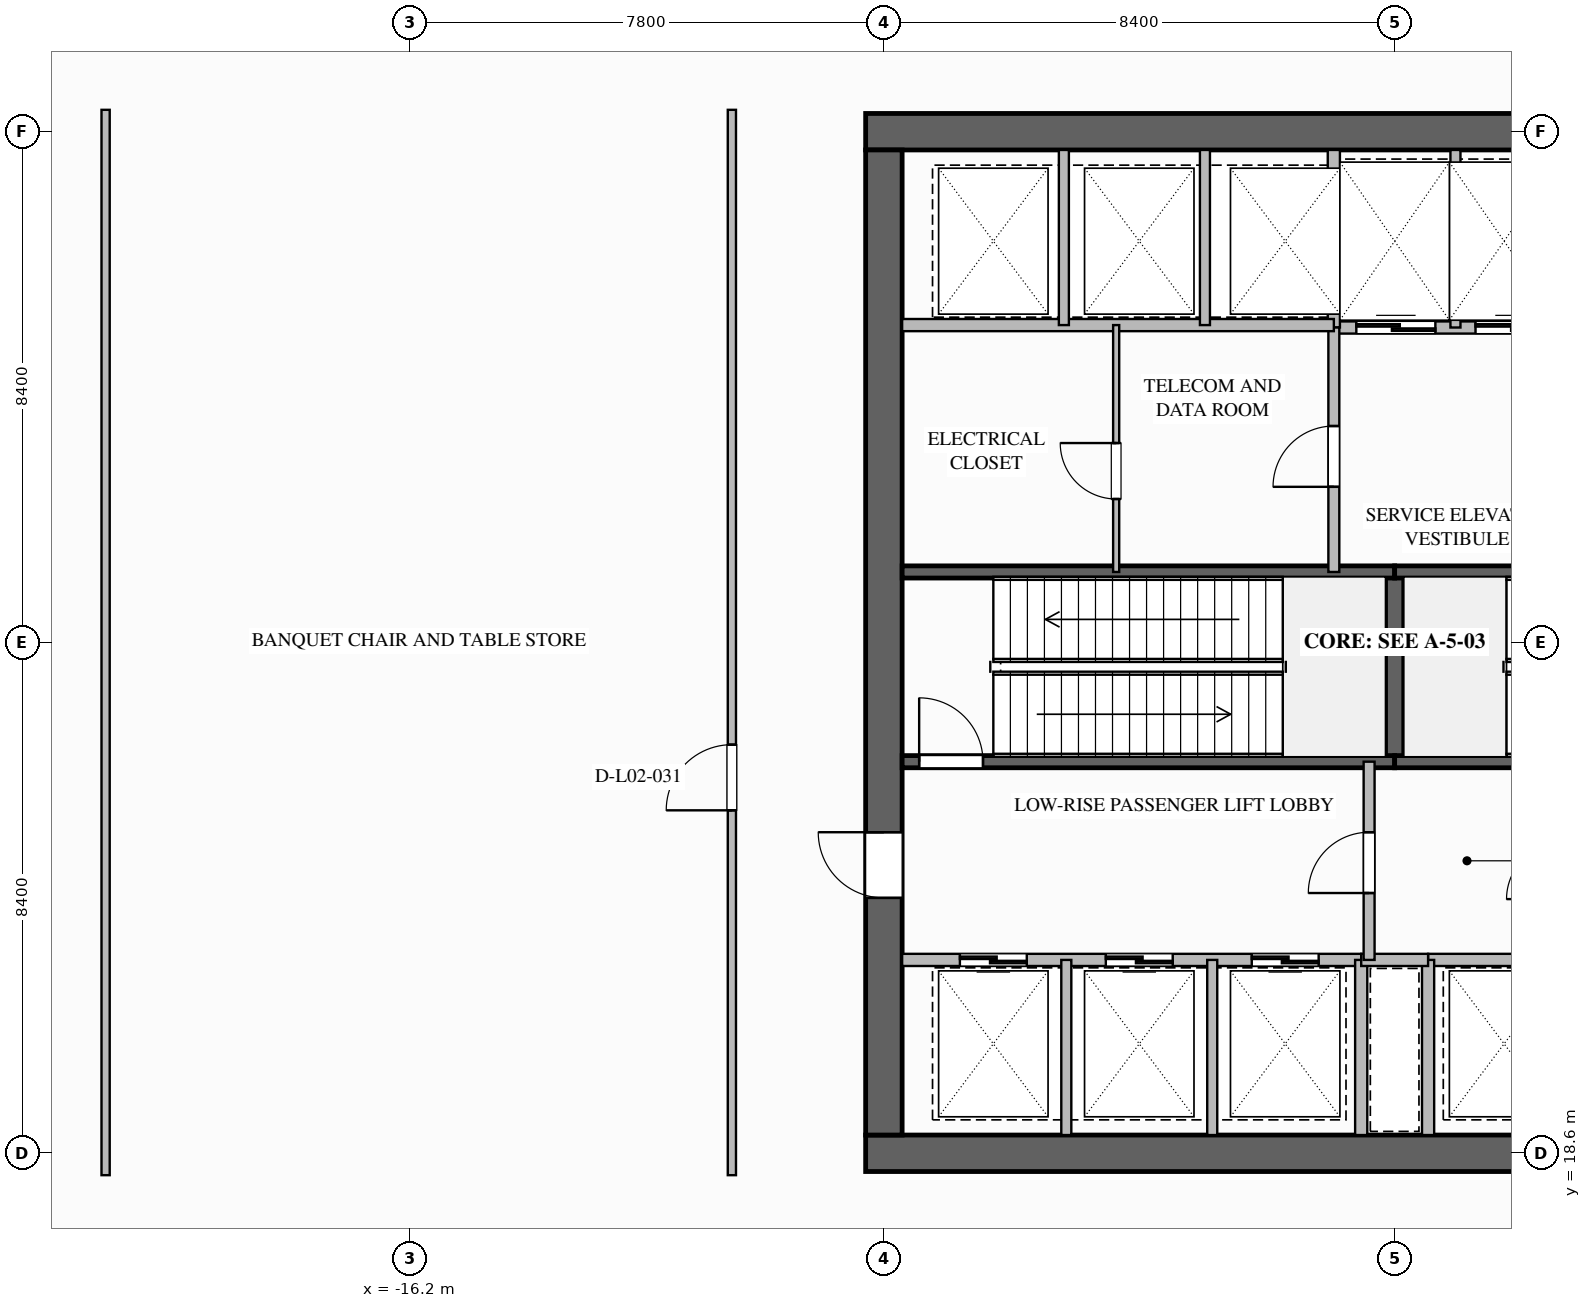
"""IFC4 building model, lengths in metres.
Left out: names, types, materials, properties, quantities, classifications, styles, units other than length and angle.
Written with IfcOpenShell. Run it as: python <this file> out.ifc"""

import sys

from ifc_helpers import new_model, si_unit, direction, frame, frame_2d, origin, place, context, subcontext, project, spatial, rectangle, extrude, element, fill, save


model = new_model("IFC4")
c1 = context("Model", 3, precision=1e-05, world=origin(), true_north=direction((0.0, 1.0)))
c2 = subcontext(c1, "Body", "Model", "MODEL_VIEW")
j1 = project(units=[si_unit("LENGTHUNIT", "METRE"), si_unit("PLANEANGLEUNIT", "RADIAN")], contexts=[c1])
p1 = place(None, origin())
s1 = spatial("IfcSite", under=j1, at=p1, CompositionType="ELEMENT")
p2 = place(p1, origin())
s2 = spatial("IfcBuilding", under=s1, at=p2, CompositionType="ELEMENT")
p3 = place(p2, frame((0.0, 0.0, 10.8)))
s3 = spatial("IfcBuildingStorey", under=s2, at=p3, CompositionType="ELEMENT", Elevation=10.8)
for number, where, z_axis, x_axis in (
    (1, (-8.7, 35.4, 0.0), (0.0, 0.0, 1.0), (1.0, 0.0, 0.0)),
    (2, (8.7, 18.6, 0.0), (0.0, 0.0, 1.0), (-1.0, 0.0, 0.0)),
):
    element("IfcWall", number, at=place(p3, frame(where, z_axis=z_axis, x_axis=x_axis)), inside=s3, PredefinedType="SHEAR", context=c2, shape_type="SweptSolid", body=[
        extrude(rectangle(XDim=17.4, YDim=0.6, at=frame_2d((8.7, 0.0))), origin(), (0.0, 0.0, 1.0), 6.4),
    ])
p4 = place(p3, frame((-8.4, 18.9, 0.0), z_axis=(0.0, 0.0, 1.0), x_axis=(0.0, 1.0, 0.0)))
e3 = element("IfcWall", 3, at=p4, inside=s3, PredefinedType="SHEAR", context=c2, shape_type="SweptSolid", body=[
    extrude(rectangle(XDim=16.2, YDim=0.6, at=frame_2d((8.1, 0.0))), origin(), (0.0, 0.0, 1.0), 6.4),
])
p5 = place(p4, frame((3.9, 0.0, 0.0)))
e4 = element("IfcOpeningElement", 4, at=p5, cuts=e3, PredefinedType="OPENING", context=c2, shape_type="SweptSolid", body=[
    extrude(rectangle(XDim=1.08, YDim=2.04, at=frame_2d((0.54, 1.02))), frame((0.0, 0.31, 0.0), z_axis=(0.0, -1.0, 0.0), x_axis=(1.0, 0.0, 0.0)), (0.0, 0.0, 1.0), 0.62),
])
p6 = place(p3, frame((0.0, 25.04, 0.0), z_axis=(0.0, 0.0, 1.0), x_axis=(0.0, 1.0, 0.0)))
e5 = element("IfcWall", 5, at=p6, inside=s3, PredefinedType="SOLIDWALL", context=c2, shape_type="SweptSolid", body=[
    extrude(rectangle(XDim=3.12, YDim=0.3, at=frame_2d((1.56, 0.0))), origin(), (0.0, 0.0, 1.0), 6.1),
])
p7 = place(p3, frame((-8.1, 25.04, 0.0), z_axis=(0.0, 0.0, 1.0), x_axis=(1.0, 0.0, 0.0)))
e6 = element("IfcWall", 6, at=p7, inside=s3, PredefinedType="SOLIDWALL", context=c2, shape_type="SweptSolid", body=[
    extrude(rectangle(XDim=8.1, YDim=0.2, at=frame_2d((4.05, 0.0))), origin(), (0.0, 0.0, 1.0), 6.1),
])
p8 = place(p7, frame((0.28, 0.0, 0.0)))
e7 = element("IfcOpeningElement", 7, at=p8, cuts=e6, PredefinedType="OPENING", context=c2, shape_type="SweptSolid", body=[
    extrude(rectangle(XDim=1.05, YDim=2.1, at=frame_2d((0.525, 1.05))), frame((0.0, 0.11, 0.0), z_axis=(0.0, -1.0, 0.0), x_axis=(1.0, 0.0, 0.0)), (0.0, 0.0, 1.0), 0.22),
])
for number, where, z_axis, x_axis in (
    (8, (-8.1, 28.16, 0.0), (0.0, 0.0, 1.0), (1.0, 0.0, 0.0)),
    (9, (0.0, 25.04, 0.0), (0.0, 0.0, 1.0), (1.0, 0.0, 0.0)),
):
    element("IfcWall", number, at=place(p3, frame(where, z_axis=z_axis, x_axis=x_axis)), inside=s3, PredefinedType="SOLIDWALL", context=c2, shape_type="SweptSolid", body=[
        extrude(rectangle(XDim=8.1, YDim=0.2, at=frame_2d((4.05, 0.0))), origin(), (0.0, 0.0, 1.0), 6.1),
    ])
p9 = place(p3, frame((8.1, 28.16, 0.0), z_axis=(0.0, 0.0, 1.0), x_axis=(-1.0, 0.0, 0.0)))
e10 = element("IfcWall", 10, at=p9, inside=s3, PredefinedType="SOLIDWALL", context=c2, shape_type="SweptSolid", body=[
    extrude(rectangle(XDim=8.1, YDim=0.2, at=frame_2d((4.05, 0.0))), origin(), (0.0, 0.0, 1.0), 6.1),
])
p10 = place(p9, frame((0.28, 0.0, 0.0)))
e11 = element("IfcOpeningElement", 11, at=p10, cuts=e10, PredefinedType="OPENING", context=c2, shape_type="SweptSolid", body=[
    extrude(rectangle(XDim=1.05, YDim=2.1, at=frame_2d((0.525, 1.05))), frame((0.0, 0.11, 0.0), z_axis=(0.0, -1.0, 0.0), x_axis=(1.0, 0.0, 0.0)), (0.0, 0.0, 1.0), 0.22),
])
p11 = place(p3, frame((-1.0, 32.18, 0.0), z_axis=(0.0, 0.0, 1.0), x_axis=(1.0, 0.0, 0.0)))
e12 = element("IfcWall", 12, at=p11, inside=s3, PredefinedType="SOLIDWALL", context=c2, shape_type="SweptSolid", body=[
    extrude(rectangle(XDim=4.1, YDim=0.2, at=frame_2d((2.05, 0.0))), origin(), (0.0, 0.0, 1.0), 6.1),
])
p12 = place(p11, frame((0.37, 0.0, 0.0)))
e13 = element("IfcOpeningElement", 13, at=p12, cuts=e12, PredefinedType="OPENING", context=c2, shape_type="SweptSolid", body=[
    extrude(rectangle(XDim=1.3, YDim=2.2, at=frame_2d((0.65, 1.1))), frame((0.0, 0.11, 0.0), z_axis=(0.0, -1.0, 0.0), x_axis=(1.0, 0.0, 0.0)), (0.0, 0.0, 1.0), 0.22),
])
p13 = place(p11, frame((2.33, 0.0, 0.0)))
e14 = element("IfcOpeningElement", 14, at=p13, cuts=e12, PredefinedType="OPENING", context=c2, shape_type="SweptSolid", body=[
    extrude(rectangle(XDim=1.3, YDim=2.2, at=frame_2d((0.65, 1.1))), frame((0.0, 0.11, 0.0), z_axis=(0.0, -1.0, 0.0), x_axis=(1.0, 0.0, 0.0)), (0.0, 0.0, 1.0), 0.22),
])
p14 = place(p3, frame((-1.0, 32.18, 0.0), z_axis=(0.0, 0.0, 1.0), x_axis=(0.0, 1.0, 0.0)))
e15 = element("IfcWall", 15, at=p14, inside=s3, PredefinedType="SOLIDWALL", context=c2, shape_type="SweptSolid", body=[
    extrude(rectangle(XDim=2.92, YDim=0.2, at=frame_2d((1.46, 0.0))), origin(), (0.0, 0.0, 1.0), 6.1),
])
p15 = place(p3, frame((1.0, 32.18, 0.0), z_axis=(0.0, 0.0, 1.0), x_axis=(0.0, 1.0, 0.0)))
e16 = element("IfcWall", 16, at=p15, inside=s3, PredefinedType="PARTITIONING", context=c2, shape_type="SweptSolid", body=[
    extrude(rectangle(XDim=2.92, YDim=0.165, at=frame_2d((1.46, 0.0))), origin(), (0.0, 0.0, 1.0), 6.1),
])
p16 = place(p3, frame((-1.0, 28.16, 0.0), z_axis=(0.0, 0.0, 1.0), x_axis=(0.0, 1.0, 0.0)))
e17 = element("IfcWall", 17, at=p16, inside=s3, PredefinedType="SOLIDWALL", context=c2, shape_type="SweptSolid", body=[
    extrude(rectangle(XDim=4.02, YDim=0.18, at=frame_2d((2.01, 0.0))), origin(), (0.0, 0.0, 1.0), 6.1),
])
p17 = place(p16, frame((1.4, 0.0, 0.0)))
e18 = element("IfcOpeningElement", 18, at=p17, cuts=e17, PredefinedType="OPENING", context=c2, shape_type="SweptSolid", body=[
    extrude(rectangle(XDim=1.0, YDim=2.1, at=frame_2d((0.5, 1.05))), frame((0.0, 0.1, 0.0), z_axis=(0.0, -1.0, 0.0), x_axis=(1.0, 0.0, 0.0)), (0.0, 0.0, 1.0), 0.2),
])
p18 = place(p3, frame((-8.1, 32.22, 0.0), z_axis=(0.0, 0.0, 1.0), x_axis=(1.0, 0.0, 0.0)))
e19 = element("IfcWall", 19, at=p18, inside=s3, PredefinedType="SOLIDWALL", context=c2, shape_type="SweptSolid", body=[
    extrude(rectangle(XDim=7.1, YDim=0.2, at=frame_2d((3.55, 0.0))), origin(), (0.0, 0.0, 1.0), 6.1),
])
for number, where, z_axis, x_axis in (
    (20, (-5.44, 32.22, 0.0), (0.0, 0.0, 1.0), (0.0, 1.0, 0.0)),
    (21, (-3.12, 32.22, 0.0), (0.0, 0.0, 1.0), (0.0, 1.0, 0.0)),
):
    element("IfcWall", number, at=place(p3, frame(where, z_axis=z_axis, x_axis=x_axis)), inside=s3, PredefinedType="PARTITIONING", context=c2, shape_type="SweptSolid", body=[
        extrude(rectangle(XDim=2.88, YDim=0.165, at=frame_2d((1.44, 0.0))), origin(), (0.0, 0.0, 1.0), 6.1),
    ])
p19 = place(p3, frame((-4.58, 28.16, 0.0), z_axis=(0.0, 0.0, 1.0), x_axis=(0.0, 1.0, 0.0)))
e22 = element("IfcWall", 22, at=p19, inside=s3, PredefinedType="PARTITIONING", context=c2, shape_type="SweptSolid", body=[
    extrude(rectangle(XDim=4.06, YDim=0.1, at=frame_2d((2.03, 0.0))), origin(), (0.0, 0.0, 1.0), 6.1),
])
p20 = place(p19, frame((1.2, 0.0, 0.0)))
e23 = element("IfcOpeningElement", 23, at=p20, cuts=e22, PredefinedType="OPENING", context=c2, shape_type="SweptSolid", body=[
    extrude(rectangle(XDim=0.92, YDim=2.1, at=frame_2d((0.46, 1.05))), frame((0.0, 0.06, 0.0), z_axis=(0.0, -1.0, 0.0), x_axis=(1.0, 0.0, 0.0)), (0.0, 0.0, 1.0), 0.12),
])
p21 = place(p3, frame((-0.55, 21.78, 0.0), z_axis=(0.0, 0.0, 1.0), x_axis=(-1.0, 0.0, 0.0)))
e24 = element("IfcWall", 24, at=p21, inside=s3, PredefinedType="SOLIDWALL", context=c2, shape_type="SweptSolid", body=[
    extrude(rectangle(XDim=7.55, YDim=0.2, at=frame_2d((3.775, 0.0))), origin(), (0.0, 0.0, 1.0), 6.1),
])
p22 = place(p21, frame((5.5, 0.0, 0.0)))
e25 = element("IfcOpeningElement", 25, at=p22, cuts=e24, PredefinedType="OPENING", context=c2, shape_type="SweptSolid", body=[
    extrude(rectangle(XDim=1.1, YDim=2.2, at=frame_2d((0.55, 1.1))), frame((0.0, 0.11, 0.0), z_axis=(0.0, -1.0, 0.0), x_axis=(1.0, 0.0, 0.0)), (0.0, 0.0, 1.0), 0.22),
])
p23 = place(p21, frame((3.1, 0.0, 0.0)))
e26 = element("IfcOpeningElement", 26, at=p23, cuts=e24, PredefinedType="OPENING", context=c2, shape_type="SweptSolid", body=[
    extrude(rectangle(XDim=1.1, YDim=2.2, at=frame_2d((0.55, 1.1))), frame((0.0, 0.11, 0.0), z_axis=(0.0, -1.0, 0.0), x_axis=(1.0, 0.0, 0.0)), (0.0, 0.0, 1.0), 0.22),
])
p24 = place(p21, frame((0.7, 0.0, 0.0)))
e27 = element("IfcOpeningElement", 27, at=p24, cuts=e24, PredefinedType="OPENING", context=c2, shape_type="SweptSolid", body=[
    extrude(rectangle(XDim=1.1, YDim=2.2, at=frame_2d((0.55, 1.1))), frame((0.0, 0.11, 0.0), z_axis=(0.0, -1.0, 0.0), x_axis=(1.0, 0.0, 0.0)), (0.0, 0.0, 1.0), 0.22),
])
for number, where, z_axis, x_axis in (
    (28, (-5.4, 18.9, 0.0), (0.0, 0.0, 1.0), (0.0, 1.0, 0.0)),
    (29, (-3.0, 18.9, 0.0), (0.0, 0.0, 1.0), (0.0, 1.0, 0.0)),
):
    element("IfcWall", number, at=place(p3, frame(where, z_axis=z_axis, x_axis=x_axis)), inside=s3, PredefinedType="PARTITIONING", context=c2, shape_type="SweptSolid", body=[
        extrude(rectangle(XDim=2.88, YDim=0.165, at=frame_2d((1.44, 0.0))), origin(), (0.0, 0.0, 1.0), 6.1),
    ])
p25 = place(p3, frame((-0.55, 18.9, 0.0), z_axis=(0.0, 0.0, 1.0), x_axis=(0.0, 1.0, 0.0)))
e30 = element("IfcWall", 30, at=p25, inside=s3, PredefinedType="SOLIDWALL", context=c2, shape_type="SweptSolid", body=[
    extrude(rectangle(XDim=2.88, YDim=0.2, at=frame_2d((1.44, 0.0))), origin(), (0.0, 0.0, 1.0), 6.1),
])
p26 = place(p3, frame((8.1, 21.78, 0.0), z_axis=(0.0, 0.0, 1.0), x_axis=(-1.0, 0.0, 0.0)))
e31 = element("IfcWall", 31, at=p26, inside=s3, PredefinedType="SOLIDWALL", context=c2, shape_type="SweptSolid", body=[
    extrude(rectangle(XDim=7.55, YDim=0.2, at=frame_2d((3.775, 0.0))), origin(), (0.0, 0.0, 1.0), 6.1),
])
p27 = place(p3, frame((0.55, 18.9, 0.0), z_axis=(0.0, 0.0, 1.0), x_axis=(0.0, 1.0, 0.0)))
e32 = element("IfcWall", 32, at=p27, inside=s3, PredefinedType="SOLIDWALL", context=c2, shape_type="SweptSolid", body=[
    extrude(rectangle(XDim=2.88, YDim=0.2, at=frame_2d((1.44, 0.0))), origin(), (0.0, 0.0, 1.0), 6.1),
])
p28 = place(p3, frame((-0.55, 21.78, 0.0), z_axis=(0.0, 0.0, 1.0), x_axis=(1.0, 0.0, 0.0)))
e33 = element("IfcWall", 33, at=p28, inside=s3, PredefinedType="SOLIDWALL", context=c2, shape_type="SweptSolid", body=[
    extrude(rectangle(XDim=1.1, YDim=0.2, at=frame_2d((0.55, 0.0))), origin(), (0.0, 0.0, 1.0), 6.1),
])
p29 = place(p3, frame((-0.42, 21.78, 0.0), z_axis=(0.0, 0.0, 1.0), x_axis=(0.0, 1.0, 0.0)))
e34 = element("IfcWall", 34, at=p29, inside=s3, PredefinedType="SOLIDWALL", context=c2, shape_type="SweptSolid", body=[
    extrude(rectangle(XDim=3.26, YDim=0.18, at=frame_2d((1.63, 0.0))), origin(), (0.0, 0.0, 1.0), 6.1),
])
p30 = place(p29, frame((1.1, 0.0, 0.0)))
e35 = element("IfcOpeningElement", 35, at=p30, cuts=e34, PredefinedType="OPENING", context=c2, shape_type="SweptSolid", body=[
    extrude(rectangle(XDim=1.0, YDim=2.1, at=frame_2d((0.5, 1.05))), frame((0.0, 0.1, 0.0), z_axis=(0.0, -1.0, 0.0), x_axis=(1.0, 0.0, 0.0)), (0.0, 0.0, 1.0), 0.2),
])
p31 = place(p3, frame((-10.9, 18.24, 0.0), z_axis=(0.0, 0.0, 1.0), x_axis=(0.0, 1.0, 0.0)))
e36 = element("IfcWall", 36, at=p31, inside=s3, PredefinedType="PARTITIONING", context=c2, shape_type="SweptSolid", body=[
    extrude(rectangle(XDim=17.52, YDim=0.135, at=frame_2d((8.76, 0.0))), origin(), (0.0, 0.0, 1.0), 6.1),
])
p32 = place(p31, frame((6.0, 0.0, 0.0)))
e37 = element("IfcOpeningElement", 37, at=p32, cuts=e36, PredefinedType="OPENING", context=c2, shape_type="SweptSolid", body=[
    extrude(rectangle(XDim=1.08, YDim=2.04, at=frame_2d((0.54, 1.02))), frame((0.0, 0.077, 0.0), z_axis=(0.0, -1.0, 0.0), x_axis=(1.0, 0.0, 0.0)), (0.0, 0.0, 1.0), 0.155),
])
p33 = place(p3, frame((-21.2, 18.24, 0.0), z_axis=(0.0, 0.0, 1.0), x_axis=(0.0, 1.0, 0.0)))
e38 = element("IfcWall", 38, at=p33, inside=s3, PredefinedType="PARTITIONING", context=c2, shape_type="SweptSolid", body=[
    extrude(rectangle(XDim=17.52, YDim=0.135, at=frame_2d((8.76, 0.0))), origin(), (0.0, 0.0, 1.0), 6.1),
])
p34 = place(p8, origin())
e39 = element("IfcDoor", 39, at=p34, inside=s3, OperationType="SINGLE_SWING_LEFT", PredefinedType="DOOR", context=c2, shape_type="SweptSolid", body=[
    extrude(rectangle(XDim=1.05, YDim=2.1, at=frame_2d((0.525, 1.05))), frame((0.0, 0.025, 0.0), z_axis=(0.0, -1.0, 0.0), x_axis=(1.0, 0.0, 0.0)), (0.0, 0.0, 1.0), 0.05),
])
fill(e7, e39)
p35 = place(p12, origin())
e40 = element("IfcDoor", 40, at=p35, inside=s3, OperationType="SLIDING_TO_LEFT", PredefinedType="DOOR", context=c2, shape_type="SweptSolid", body=[
    extrude(rectangle(XDim=1.3, YDim=2.2, at=frame_2d((0.65, 1.1))), frame((0.0, 0.025, 0.0), z_axis=(0.0, -1.0, 0.0), x_axis=(1.0, 0.0, 0.0)), (0.0, 0.0, 1.0), 0.05),
])
fill(e13, e40)
p36 = place(p13, origin())
e41 = element("IfcDoor", 41, at=p36, inside=s3, OperationType="SLIDING_TO_LEFT", PredefinedType="DOOR", context=c2, shape_type="SweptSolid", body=[
    extrude(rectangle(XDim=1.3, YDim=2.2, at=frame_2d((0.65, 1.1))), frame((0.0, 0.025, 0.0), z_axis=(0.0, -1.0, 0.0), x_axis=(1.0, 0.0, 0.0)), (0.0, 0.0, 1.0), 0.05),
])
fill(e14, e41)
p37 = place(p17, origin())
e42 = element("IfcDoor", 42, at=p37, inside=s3, OperationType="SINGLE_SWING_LEFT", PredefinedType="DOOR", context=c2, shape_type="SweptSolid", body=[
    extrude(rectangle(XDim=1.0, YDim=2.1, at=frame_2d((0.5, 1.05))), frame((0.0, 0.025, 0.0), z_axis=(0.0, -1.0, 0.0), x_axis=(1.0, 0.0, 0.0)), (0.0, 0.0, 1.0), 0.05),
])
fill(e18, e42)
p38 = place(p20, origin())
e43 = element("IfcDoor", 43, at=p38, inside=s3, OperationType="SINGLE_SWING_RIGHT", PredefinedType="DOOR", context=c2, shape_type="SweptSolid", body=[
    extrude(rectangle(XDim=0.92, YDim=2.1, at=frame_2d((0.46, 1.05))), frame((0.0, 0.025, 0.0), z_axis=(0.0, -1.0, 0.0), x_axis=(1.0, 0.0, 0.0)), (0.0, 0.0, 1.0), 0.05),
])
fill(e23, e43)
p39 = place(p22, origin())
e44 = element("IfcDoor", 44, at=p39, inside=s3, OperationType="SLIDING_TO_LEFT", PredefinedType="DOOR", context=c2, shape_type="SweptSolid", body=[
    extrude(rectangle(XDim=1.1, YDim=2.2, at=frame_2d((0.55, 1.1))), frame((0.0, 0.025, 0.0), z_axis=(0.0, -1.0, 0.0), x_axis=(1.0, 0.0, 0.0)), (0.0, 0.0, 1.0), 0.05),
])
fill(e25, e44)
p40 = place(p23, origin())
e45 = element("IfcDoor", 45, at=p40, inside=s3, OperationType="SLIDING_TO_LEFT", PredefinedType="DOOR", context=c2, shape_type="SweptSolid", body=[
    extrude(rectangle(XDim=1.1, YDim=2.2, at=frame_2d((0.55, 1.1))), frame((0.0, 0.025, 0.0), z_axis=(0.0, -1.0, 0.0), x_axis=(1.0, 0.0, 0.0)), (0.0, 0.0, 1.0), 0.05),
])
fill(e26, e45)
p41 = place(p24, origin())
e46 = element("IfcDoor", 46, at=p41, inside=s3, OperationType="SLIDING_TO_LEFT", PredefinedType="DOOR", context=c2, shape_type="SweptSolid", body=[
    extrude(rectangle(XDim=1.1, YDim=2.2, at=frame_2d((0.55, 1.1))), frame((0.0, 0.025, 0.0), z_axis=(0.0, -1.0, 0.0), x_axis=(1.0, 0.0, 0.0)), (0.0, 0.0, 1.0), 0.05),
])
fill(e27, e46)
p42 = place(p30, origin())
e47 = element("IfcDoor", 47, at=p42, inside=s3, OperationType="SINGLE_SWING_LEFT", PredefinedType="DOOR", context=c2, shape_type="SweptSolid", body=[
    extrude(rectangle(XDim=1.0, YDim=2.1, at=frame_2d((0.5, 1.05))), frame((0.0, 0.025, 0.0), z_axis=(0.0, -1.0, 0.0), x_axis=(1.0, 0.0, 0.0)), (0.0, 0.0, 1.0), 0.05),
])
fill(e35, e47)
p43 = place(p5, origin())
e48 = element("IfcDoor", 48, at=p43, inside=s3, OperationType="SINGLE_SWING_RIGHT", PredefinedType="DOOR", context=c2, shape_type="SweptSolid", body=[
    extrude(rectangle(XDim=1.08, YDim=2.04, at=frame_2d((0.54, 1.02))), frame((0.0, 0.025, 0.0), z_axis=(0.0, -1.0, 0.0), x_axis=(1.0, 0.0, 0.0)), (0.0, 0.0, 1.0), 0.05),
])
fill(e4, e48)
p44 = place(p32, origin())
e49 = element("IfcDoor", 49, at=p44, inside=s3, OperationType="SINGLE_SWING_LEFT", PredefinedType="DOOR", context=c2, shape_type="SweptSolid", body=[
    extrude(rectangle(XDim=1.08, YDim=2.04, at=frame_2d((0.54, 1.02))), frame((0.0, 0.025, 0.0), z_axis=(0.0, -1.0, 0.0), x_axis=(1.0, 0.0, 0.0)), (0.0, 0.0, 1.0), 0.05),
])
fill(e37, e49)
save(model, sys.argv[1])
